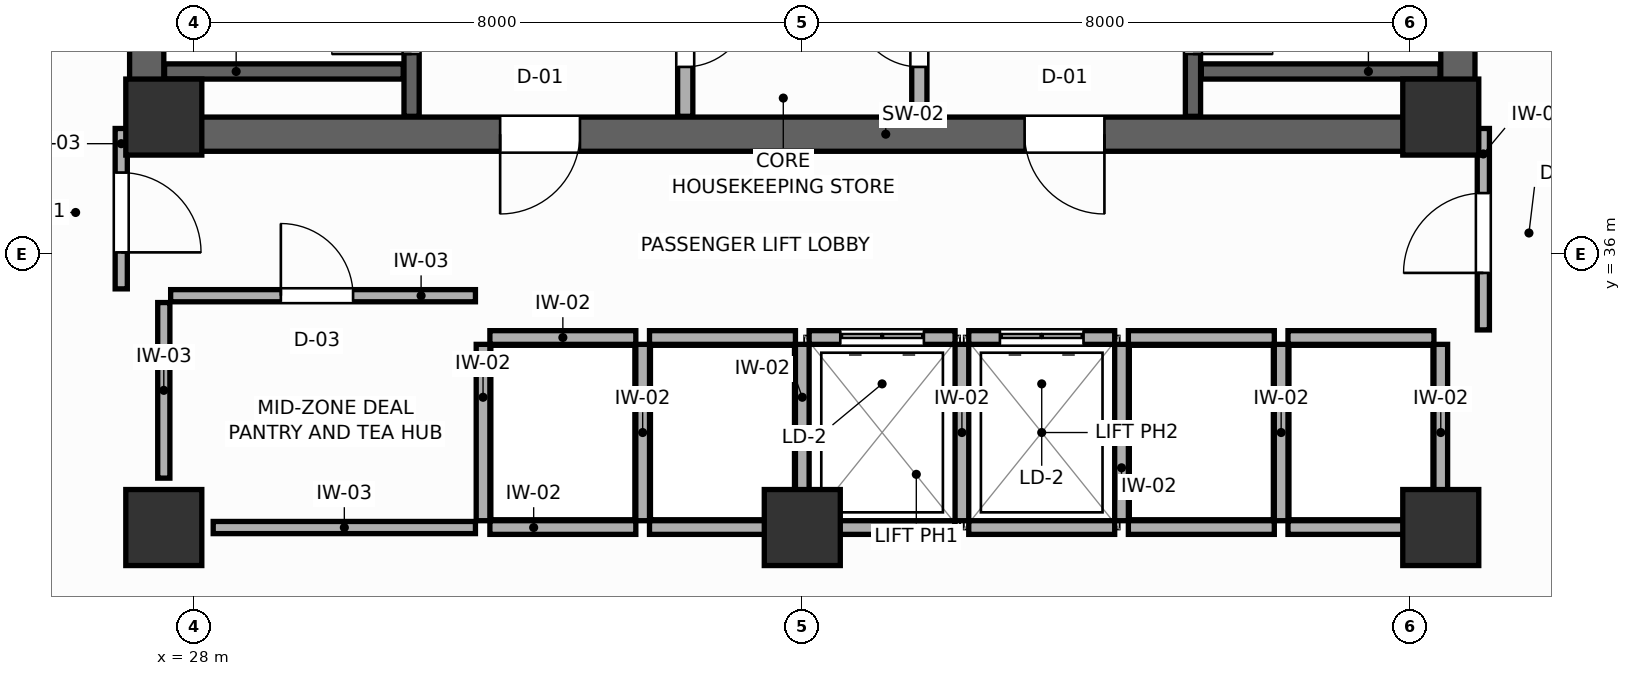
"""IFC4 building model, lengths in metres.
Left out: names, types, materials, properties, quantities, classifications, styles, units other than length and angle.
Written with IfcOpenShell. Run it as: python <this file> out.ifc"""

import sys

from ifc_helpers import new_model, si_unit, direction, frame, frame_2d, origin, origin_2d, place, context, subcontext, project, spatial, rectangle, extrude, source, transform, mapped, element, fill, save


model = new_model("IFC4")
c1 = context("Model", 3, precision=1e-05, world=origin(), true_north=direction((0.0, 1.0)))
c2 = subcontext(c1, "Body", "Model", "MODEL_VIEW")
j1 = project(units=[si_unit("LENGTHUNIT", "METRE"), si_unit("PLANEANGLEUNIT", "RADIAN")], contexts=[c1])
p1 = place(None, origin())
s1 = spatial("IfcSite", under=j1, at=p1, CompositionType="ELEMENT")
p2 = place(p1, origin())
s2 = spatial("IfcBuilding", under=s1, at=p2, CompositionType="ELEMENT")
p3 = place(p2, frame((0.0, 0.0, 172.2)))
s3 = spatial("IfcBuildingStorey", under=s2, at=p3, CompositionType="ELEMENT", Elevation=172.2)
p4 = place(p3, frame((27.15, 37.575, 0.0), z_axis=(0.0, 0.0, 1.0), x_axis=(1.0, 0.0, 0.0)))
e1 = element("IfcWall", 1, at=p4, inside=s3, PredefinedType="SHEAR", context=c2, shape_type="SweptSolid", body=[
    extrude(rectangle(XDim=17.7, YDim=0.45, at=frame_2d((8.85, 0.0))), origin(), (0.0, 0.0, 1.0), 3.6),
])
p5 = place(p4, frame((4.875, 0.0, 0.0)))
e2 = element("IfcOpeningElement", 2, at=p5, cuts=e1, PredefinedType="OPENING", context=c2, shape_type="SweptSolid", body=[
    extrude(rectangle(XDim=1.05, YDim=2.1, at=frame_2d((0.525, 1.05))), frame((0.0, 0.235, 0.0), z_axis=(0.0, -1.0, 0.0), x_axis=(1.0, 0.0, 0.0)), (0.0, 0.0, 1.0), 0.47),
])
p6 = place(p4, frame((11.775, 0.0, 0.0)))
e3 = element("IfcOpeningElement", 3, at=p6, cuts=e1, PredefinedType="OPENING", context=c2, shape_type="SweptSolid", body=[
    extrude(rectangle(XDim=1.05, YDim=2.1, at=frame_2d((0.525, 1.05))), frame((0.0, 0.235, 0.0), z_axis=(0.0, -1.0, 0.0), x_axis=(1.0, 0.0, 0.0)), (0.0, 0.0, 1.0), 0.47),
])
for number, where, z_axis, x_axis in (
    (4, (27.375, 37.8, 0.0), (0.0, 0.0, 1.0), (0.0, 1.0, 0.0)),
    (5, (44.625, 37.8, 0.0), (0.0, 0.0, 1.0), (0.0, 1.0, 0.0)),
):
    element("IfcWall", number, at=place(p3, frame(where, z_axis=z_axis, x_axis=x_axis)), inside=s3, PredefinedType="SHEAR", context=c2, shape_type="SweptSolid", body=[
        extrude(rectangle(XDim=9.0, YDim=0.45, at=frame_2d((4.5, 0.0))), origin(), (0.0, 0.0, 1.0), 3.6),
    ])
m1 = source(origin(), c2, "Body", "SweptSolid", [
    extrude(rectangle(XDim=1.0, YDim=1.0, at=origin_2d()), origin(), (0.0, 0.0, 1.0), 3.6),
])
for number, where, z_axis, x_axis in (
    (6, (27.6, 37.8, 0.0), (0.0, 0.0, 1.0), (1.0, 0.0, 0.0)),
    (7, (44.4, 37.8, 0.0), (0.0, 0.0, 1.0), (1.0, 0.0, 0.0)),
    (8, (27.6, 32.4, 0.0), (0.0, 0.0, 1.0), (1.0, 0.0, 0.0)),
    (9, (44.4, 32.4, 0.0), (0.0, 0.0, 1.0), (1.0, 0.0, 0.0)),
    (10, (36.0, 32.4, 0.0), (0.0, 0.0, 1.0), (1.0, 0.0, 0.0)),
):
    element("IfcColumn", number, at=place(p3, frame(where, z_axis=z_axis, x_axis=x_axis)), inside=s3, PredefinedType="COLUMN", context=c2, shape_type="MappedRepresentation", body=[
        mapped(m1, transform((0.0, 0.0, 0.0), scale=1.0)),
    ])
p7 = place(p3, frame((30.86, 37.81, 0.0), z_axis=(0.0, 0.0, 1.0), x_axis=(0.0, 1.0, 0.0)))
e11 = element("IfcWall", 11, at=p7, inside=s3, PredefinedType="SHEAR", context=c2, shape_type="SweptSolid", body=[
    extrude(rectangle(XDim=8.98, YDim=0.2, at=frame_2d((4.49, 0.0))), origin(), (0.0, 0.0, 1.0), 3.6),
])
p8 = place(p7, frame((0.82, 0.0, 0.0)))
e12 = element("IfcOpeningElement", 12, at=p8, cuts=e11, PredefinedType="OPENING", context=c2, shape_type="SweptSolid", body=[
    extrude(rectangle(XDim=1.05, YDim=2.1, at=frame_2d((0.525, 1.05))), frame((0.0, 0.11, 0.0), z_axis=(0.0, -1.0, 0.0), x_axis=(1.0, 0.0, 0.0)), (0.0, 0.0, 1.0), 0.22),
])
p9 = place(p3, frame((27.61, 38.4, 0.0), z_axis=(0.0, 0.0, 1.0), x_axis=(1.0, 0.0, 0.0)))
e13 = element("IfcWall", 13, at=p9, inside=s3, PredefinedType="SHEAR", context=c2, shape_type="SweptSolid", body=[
    extrude(rectangle(XDim=3.14, YDim=0.2, at=frame_2d((1.57, 0.0))), origin(), (0.0, 0.0, 1.0), 3.6),
])
p10 = place(p3, frame((41.14, 37.81, 0.0), z_axis=(0.0, 0.0, 1.0), x_axis=(0.0, 1.0, 0.0)))
e14 = element("IfcWall", 14, at=p10, inside=s3, PredefinedType="SHEAR", context=c2, shape_type="SweptSolid", body=[
    extrude(rectangle(XDim=8.98, YDim=0.2, at=frame_2d((4.49, 0.0))), origin(), (0.0, 0.0, 1.0), 3.6),
])
p11 = place(p10, frame((0.82, 0.0, 0.0)))
e15 = element("IfcOpeningElement", 15, at=p11, cuts=e14, PredefinedType="OPENING", context=c2, shape_type="SweptSolid", body=[
    extrude(rectangle(XDim=1.05, YDim=2.1, at=frame_2d((0.525, 1.05))), frame((0.0, 0.11, 0.0), z_axis=(0.0, -1.0, 0.0), x_axis=(1.0, 0.0, 0.0)), (0.0, 0.0, 1.0), 0.22),
])
p12 = place(p3, frame((41.25, 38.4, 0.0), z_axis=(0.0, 0.0, 1.0), x_axis=(1.0, 0.0, 0.0)))
e16 = element("IfcWall", 16, at=p12, inside=s3, PredefinedType="SHEAR", context=c2, shape_type="SweptSolid", body=[
    extrude(rectangle(XDim=3.14, YDim=0.2, at=frame_2d((1.57, 0.0))), origin(), (0.0, 0.0, 1.0), 3.6),
])
p13 = place(p3, frame((34.46, 37.81, 0.0), z_axis=(0.0, 0.0, 1.0), x_axis=(0.0, 1.0, 0.0)))
e17 = element("IfcWall", 17, at=p13, inside=s3, PredefinedType="PARTITIONING", context=c2, shape_type="SweptSolid", body=[
    extrude(rectangle(XDim=8.98, YDim=0.2, at=frame_2d((4.49, 0.0))), origin(), (0.0, 0.0, 1.0), 3.4),
])
p14 = place(p13, frame((0.65, 0.0, 0.0)))
e18 = element("IfcOpeningElement", 18, at=p14, cuts=e17, PredefinedType="OPENING", context=c2, shape_type="SweptSolid", body=[
    extrude(rectangle(XDim=0.85, YDim=2.05, at=frame_2d((0.425, 1.025))), frame((0.0, 0.11, 0.0), z_axis=(0.0, -1.0, 0.0), x_axis=(1.0, 0.0, 0.0)), (0.0, 0.0, 1.0), 0.22),
])
p15 = place(p3, frame((37.54, 37.81, 0.0), z_axis=(0.0, 0.0, 1.0), x_axis=(0.0, 1.0, 0.0)))
e19 = element("IfcWall", 19, at=p15, inside=s3, PredefinedType="PARTITIONING", context=c2, shape_type="SweptSolid", body=[
    extrude(rectangle(XDim=8.98, YDim=0.2, at=frame_2d((4.49, 0.0))), origin(), (0.0, 0.0, 1.0), 3.4),
])
p16 = place(p15, frame((0.65, 0.0, 0.0)))
e20 = element("IfcOpeningElement", 20, at=p16, cuts=e19, PredefinedType="OPENING", context=c2, shape_type="SweptSolid", body=[
    extrude(rectangle(XDim=0.85, YDim=2.05, at=frame_2d((0.425, 1.025))), frame((0.0, 0.11, 0.0), z_axis=(0.0, -1.0, 0.0), x_axis=(1.0, 0.0, 0.0)), (0.0, 0.0, 1.0), 0.22),
])
p17 = place(p3, frame((31.89, 34.9, 0.0), z_axis=(0.0, 0.0, 1.0), x_axis=(1.0, 0.0, 0.0)))
e21 = element("IfcWall", 21, at=p17, inside=s3, PredefinedType="PARTITIONING", context=c2, shape_type="SweptSolid", body=[
    extrude(rectangle(XDim=1.92, YDim=0.18, at=frame_2d((0.96, 0.0))), origin(), (0.0, 0.0, 1.0), 3.4),
])
p18 = place(p3, frame((31.89, 32.4, 0.0), z_axis=(0.0, 0.0, 1.0), x_axis=(1.0, 0.0, 0.0)))
e22 = element("IfcWall", 22, at=p18, inside=s3, PredefinedType="PARTITIONING", context=c2, shape_type="SweptSolid", body=[
    extrude(rectangle(XDim=1.92, YDim=0.18, at=frame_2d((0.96, 0.0))), origin(), (0.0, 0.0, 1.0), 2.95),
])
p19 = place(p3, frame((31.8, 32.49, 0.0), z_axis=(0.0, 0.0, 1.0), x_axis=(0.0, 1.0, 0.0)))
e23 = element("IfcWall", 23, at=p19, inside=s3, PredefinedType="PARTITIONING", context=c2, shape_type="SweptSolid", body=[
    extrude(rectangle(XDim=2.32, YDim=0.18, at=frame_2d((1.16, 0.0))), origin(), (0.0, 0.0, 1.0), 3.4),
])
p20 = place(p3, frame((33.99, 34.9, 0.0), z_axis=(0.0, 0.0, 1.0), x_axis=(1.0, 0.0, 0.0)))
e24 = element("IfcWall", 24, at=p20, inside=s3, PredefinedType="PARTITIONING", context=c2, shape_type="SweptSolid", body=[
    extrude(rectangle(XDim=1.92, YDim=0.18, at=frame_2d((0.96, 0.0))), origin(), (0.0, 0.0, 1.0), 3.4),
])
p21 = place(p3, frame((33.99, 32.4, 0.0), z_axis=(0.0, 0.0, 1.0), x_axis=(1.0, 0.0, 0.0)))
e25 = element("IfcWall", 25, at=p21, inside=s3, PredefinedType="PARTITIONING", context=c2, shape_type="SweptSolid", body=[
    extrude(rectangle(XDim=1.92, YDim=0.18, at=frame_2d((0.96, 0.0))), origin(), (0.0, 0.0, 1.0), 2.95),
])
p22 = place(p3, frame((33.9, 32.49, 0.0), z_axis=(0.0, 0.0, 1.0), x_axis=(0.0, 1.0, 0.0)))
e26 = element("IfcWall", 26, at=p22, inside=s3, PredefinedType="PARTITIONING", context=c2, shape_type="SweptSolid", body=[
    extrude(rectangle(XDim=2.32, YDim=0.18, at=frame_2d((1.16, 0.0))), origin(), (0.0, 0.0, 1.0), 3.4),
])
p23 = place(p3, frame((36.09, 34.9, 0.0), z_axis=(0.0, 0.0, 1.0), x_axis=(1.0, 0.0, 0.0)))
e27 = element("IfcWall", 27, at=p23, inside=s3, PredefinedType="PARTITIONING", context=c2, shape_type="SweptSolid", body=[
    extrude(rectangle(XDim=1.92, YDim=0.18, at=frame_2d((0.96, 0.0))), origin(), (0.0, 0.0, 1.0), 3.4),
])
p24 = place(p23, frame((0.41, 0.0, 0.0)))
e28 = element("IfcOpeningElement", 28, at=p24, cuts=e27, PredefinedType="OPENING", context=c2, shape_type="SweptSolid", body=[
    extrude(rectangle(XDim=1.1, YDim=2.1, at=frame_2d((0.55, 1.05))), frame((0.0, 0.1, 0.0), z_axis=(0.0, -1.0, 0.0), x_axis=(1.0, 0.0, 0.0)), (0.0, 0.0, 1.0), 0.2),
])
p25 = place(p3, frame((36.09, 32.4, 0.0), z_axis=(0.0, 0.0, 1.0), x_axis=(1.0, 0.0, 0.0)))
e29 = element("IfcWall", 29, at=p25, inside=s3, PredefinedType="PARTITIONING", context=c2, shape_type="SweptSolid", body=[
    extrude(rectangle(XDim=1.92, YDim=0.18, at=frame_2d((0.96, 0.0))), origin(), (0.0, 0.0, 1.0), 2.95),
])
p26 = place(p3, frame((36.0, 32.49, 0.0), z_axis=(0.0, 0.0, 1.0), x_axis=(0.0, 1.0, 0.0)))
e30 = element("IfcWall", 30, at=p26, inside=s3, PredefinedType="PARTITIONING", context=c2, shape_type="SweptSolid", body=[
    extrude(rectangle(XDim=2.32, YDim=0.18, at=frame_2d((1.16, 0.0))), origin(), (0.0, 0.0, 1.0), 3.4),
])
p27 = place(p3, frame((38.19, 34.9, 0.0), z_axis=(0.0, 0.0, 1.0), x_axis=(1.0, 0.0, 0.0)))
e31 = element("IfcWall", 31, at=p27, inside=s3, PredefinedType="PARTITIONING", context=c2, shape_type="SweptSolid", body=[
    extrude(rectangle(XDim=1.92, YDim=0.18, at=frame_2d((0.96, 0.0))), origin(), (0.0, 0.0, 1.0), 3.4),
])
p28 = place(p27, frame((0.41, 0.0, 0.0)))
e32 = element("IfcOpeningElement", 32, at=p28, cuts=e31, PredefinedType="OPENING", context=c2, shape_type="SweptSolid", body=[
    extrude(rectangle(XDim=1.1, YDim=2.1, at=frame_2d((0.55, 1.05))), frame((0.0, 0.1, 0.0), z_axis=(0.0, -1.0, 0.0), x_axis=(1.0, 0.0, 0.0)), (0.0, 0.0, 1.0), 0.2),
])
p29 = place(p3, frame((38.19, 32.4, 0.0), z_axis=(0.0, 0.0, 1.0), x_axis=(1.0, 0.0, 0.0)))
e33 = element("IfcWall", 33, at=p29, inside=s3, PredefinedType="PARTITIONING", context=c2, shape_type="SweptSolid", body=[
    extrude(rectangle(XDim=1.92, YDim=0.18, at=frame_2d((0.96, 0.0))), origin(), (0.0, 0.0, 1.0), 2.95),
])
p30 = place(p3, frame((38.1, 32.49, 0.0), z_axis=(0.0, 0.0, 1.0), x_axis=(0.0, 1.0, 0.0)))
e34 = element("IfcWall", 34, at=p30, inside=s3, PredefinedType="PARTITIONING", context=c2, shape_type="SweptSolid", body=[
    extrude(rectangle(XDim=2.32, YDim=0.18, at=frame_2d((1.16, 0.0))), origin(), (0.0, 0.0, 1.0), 3.4),
])
p31 = place(p3, frame((40.29, 34.9, 0.0), z_axis=(0.0, 0.0, 1.0), x_axis=(1.0, 0.0, 0.0)))
e35 = element("IfcWall", 35, at=p31, inside=s3, PredefinedType="PARTITIONING", context=c2, shape_type="SweptSolid", body=[
    extrude(rectangle(XDim=1.92, YDim=0.18, at=frame_2d((0.96, 0.0))), origin(), (0.0, 0.0, 1.0), 3.4),
])
p32 = place(p3, frame((40.29, 32.4, 0.0), z_axis=(0.0, 0.0, 1.0), x_axis=(1.0, 0.0, 0.0)))
e36 = element("IfcWall", 36, at=p32, inside=s3, PredefinedType="PARTITIONING", context=c2, shape_type="SweptSolid", body=[
    extrude(rectangle(XDim=1.92, YDim=0.18, at=frame_2d((0.96, 0.0))), origin(), (0.0, 0.0, 1.0), 2.95),
])
p33 = place(p3, frame((40.2, 32.49, 0.0), z_axis=(0.0, 0.0, 1.0), x_axis=(0.0, 1.0, 0.0)))
e37 = element("IfcWall", 37, at=p33, inside=s3, PredefinedType="PARTITIONING", context=c2, shape_type="SweptSolid", body=[
    extrude(rectangle(XDim=2.32, YDim=0.18, at=frame_2d((1.16, 0.0))), origin(), (0.0, 0.0, 1.0), 3.4),
])
p34 = place(p3, frame((42.39, 34.9, 0.0), z_axis=(0.0, 0.0, 1.0), x_axis=(1.0, 0.0, 0.0)))
e38 = element("IfcWall", 38, at=p34, inside=s3, PredefinedType="PARTITIONING", context=c2, shape_type="SweptSolid", body=[
    extrude(rectangle(XDim=1.92, YDim=0.18, at=frame_2d((0.96, 0.0))), origin(), (0.0, 0.0, 1.0), 3.4),
])
p35 = place(p3, frame((42.39, 32.4, 0.0), z_axis=(0.0, 0.0, 1.0), x_axis=(1.0, 0.0, 0.0)))
e39 = element("IfcWall", 39, at=p35, inside=s3, PredefinedType="PARTITIONING", context=c2, shape_type="SweptSolid", body=[
    extrude(rectangle(XDim=1.92, YDim=0.18, at=frame_2d((0.96, 0.0))), origin(), (0.0, 0.0, 1.0), 2.95),
])
for number, where, z_axis, x_axis in (
    (40, (42.3, 32.49, 0.0), (0.0, 0.0, 1.0), (0.0, 1.0, 0.0)),
    (41, (44.4, 32.49, 0.0), (0.0, 0.0, 1.0), (0.0, 1.0, 0.0)),
):
    element("IfcWall", number, at=place(p3, frame(where, z_axis=z_axis, x_axis=x_axis)), inside=s3, PredefinedType="PARTITIONING", context=c2, shape_type="SweptSolid", body=[
        extrude(rectangle(XDim=2.32, YDim=0.18, at=frame_2d((1.16, 0.0))), origin(), (0.0, 0.0, 1.0), 3.4),
    ])
p36 = place(p3, frame((28.25, 32.4, 0.0), z_axis=(0.0, 0.0, 1.0), x_axis=(1.0, 0.0, 0.0)))
e42 = element("IfcWall", 42, at=p36, inside=s3, PredefinedType="PARTITIONING", context=c2, shape_type="SweptSolid", body=[
    extrude(rectangle(XDim=3.45, YDim=0.16, at=frame_2d((1.725, 0.0))), origin(), (0.0, 0.0, 1.0), 2.95),
])
p37 = place(p3, frame((27.6, 33.05, 0.0), z_axis=(0.0, 0.0, 1.0), x_axis=(0.0, 1.0, 0.0)))
e43 = element("IfcWall", 43, at=p37, inside=s3, PredefinedType="PARTITIONING", context=c2, shape_type="SweptSolid", body=[
    extrude(rectangle(XDim=2.31, YDim=0.16, at=frame_2d((1.155, 0.0))), origin(), (0.0, 0.0, 1.0), 3.4),
])
p38 = place(p3, frame((27.69, 35.45, 0.0), z_axis=(0.0, 0.0, 1.0), x_axis=(1.0, 0.0, 0.0)))
e44 = element("IfcWall", 44, at=p38, inside=s3, PredefinedType="PARTITIONING", context=c2, shape_type="SweptSolid", body=[
    extrude(rectangle(XDim=4.01, YDim=0.16, at=frame_2d((2.005, 0.0))), origin(), (0.0, 0.0, 1.0), 3.4),
])
p39 = place(p38, frame((1.45, 0.0, 0.0)))
e45 = element("IfcOpeningElement", 45, at=p39, cuts=e44, PredefinedType="OPENING", context=c2, shape_type="SweptSolid", body=[
    extrude(rectangle(XDim=0.95, YDim=2.05, at=frame_2d((0.475, 1.025))), frame((0.0, 0.09, 0.0), z_axis=(0.0, -1.0, 0.0), x_axis=(1.0, 0.0, 0.0)), (0.0, 0.0, 1.0), 0.18),
])
p40 = place(p3, frame((27.04, 35.54, 0.0), z_axis=(0.0, 0.0, 1.0), x_axis=(0.0, 1.0, 0.0)))
e46 = element("IfcWall", 46, at=p40, inside=s3, PredefinedType="PARTITIONING", context=c2, shape_type="SweptSolid", body=[
    extrude(rectangle(XDim=2.11, YDim=0.16, at=frame_2d((1.055, 0.0))), origin(), (0.0, 0.0, 1.0), 3.4),
])
p41 = place(p40, frame((0.48, 0.0, 0.0)))
e47 = element("IfcOpeningElement", 47, at=p41, cuts=e46, PredefinedType="OPENING", context=c2, shape_type="SweptSolid", body=[
    extrude(rectangle(XDim=1.05, YDim=2.1, at=frame_2d((0.525, 1.05))), frame((0.0, 0.09, 0.0), z_axis=(0.0, -1.0, 0.0), x_axis=(1.0, 0.0, 0.0)), (0.0, 0.0, 1.0), 0.18),
])
p42 = place(p3, frame((44.96, 35.0, 0.0), z_axis=(0.0, 0.0, 1.0), x_axis=(0.0, 1.0, 0.0)))
e48 = element("IfcWall", 48, at=p42, inside=s3, PredefinedType="PARTITIONING", context=c2, shape_type="SweptSolid", body=[
    extrude(rectangle(XDim=2.65, YDim=0.16, at=frame_2d((1.325, 0.0))), origin(), (0.0, 0.0, 1.0), 3.4),
])
p43 = place(p42, frame((0.75, 0.0, 0.0)))
e49 = element("IfcOpeningElement", 49, at=p43, cuts=e48, PredefinedType="OPENING", context=c2, shape_type="SweptSolid", body=[
    extrude(rectangle(XDim=1.05, YDim=2.1, at=frame_2d((0.525, 1.05))), frame((0.0, 0.09, 0.0), z_axis=(0.0, -1.0, 0.0), x_axis=(1.0, 0.0, 0.0)), (0.0, 0.0, 1.0), 0.18),
])
p44 = place(p8, origin())
e50 = element("IfcDoor", 50, at=p44, inside=s3, OperationType="SINGLE_SWING_LEFT", PredefinedType="DOOR", context=c2, shape_type="SweptSolid", body=[
    extrude(rectangle(XDim=1.05, YDim=2.1, at=frame_2d((0.525, 1.05))), frame((0.0, 0.025, 0.0), z_axis=(0.0, -1.0, 0.0), x_axis=(1.0, 0.0, 0.0)), (0.0, 0.0, 1.0), 0.05),
])
fill(e12, e50)
p45 = place(p11, frame((1.05, 0.0, 0.0), z_axis=(0.0, 0.0, 1.0), x_axis=(-1.0, 0.0, 0.0)))
e51 = element("IfcDoor", 51, at=p45, inside=s3, OperationType="SINGLE_SWING_RIGHT", PredefinedType="DOOR", context=c2, shape_type="SweptSolid", body=[
    extrude(rectangle(XDim=1.05, YDim=2.1, at=frame_2d((0.525, 1.05))), frame((0.0, 0.025, 0.0), z_axis=(0.0, -1.0, 0.0), x_axis=(1.0, 0.0, 0.0)), (0.0, 0.0, 1.0), 0.05),
])
fill(e15, e51)
p46 = place(p14, frame((0.85, 0.0, 0.0), z_axis=(0.0, 0.0, 1.0), x_axis=(-1.0, 0.0, 0.0)))
e52 = element("IfcDoor", 52, at=p46, inside=s3, OperationType="SINGLE_SWING_LEFT", PredefinedType="DOOR", context=c2, shape_type="SweptSolid", body=[
    extrude(rectangle(XDim=0.85, YDim=2.05, at=frame_2d((0.425, 1.025))), frame((0.0, 0.025, 0.0), z_axis=(0.0, -1.0, 0.0), x_axis=(1.0, 0.0, 0.0)), (0.0, 0.0, 1.0), 0.05),
])
fill(e18, e52)
p47 = place(p16, origin())
e53 = element("IfcDoor", 53, at=p47, inside=s3, OperationType="SINGLE_SWING_RIGHT", PredefinedType="DOOR", context=c2, shape_type="SweptSolid", body=[
    extrude(rectangle(XDim=0.85, YDim=2.05, at=frame_2d((0.425, 1.025))), frame((0.0, 0.025, 0.0), z_axis=(0.0, -1.0, 0.0), x_axis=(1.0, 0.0, 0.0)), (0.0, 0.0, 1.0), 0.05),
])
fill(e20, e53)
p48 = place(p24, origin())
e54 = element("IfcDoor", 54, at=p48, inside=s3, OperationType="DOUBLE_DOOR_SLIDING", PredefinedType="DOOR", context=c2, shape_type="SweptSolid", body=[
    extrude(rectangle(XDim=1.1, YDim=2.1, at=frame_2d((0.55, 1.05))), frame((0.0, 0.025, 0.0), z_axis=(0.0, -1.0, 0.0), x_axis=(1.0, 0.0, 0.0)), (0.0, 0.0, 1.0), 0.05),
])
fill(e28, e54)
p49 = place(p28, origin())
e55 = element("IfcDoor", 55, at=p49, inside=s3, OperationType="DOUBLE_DOOR_SLIDING", PredefinedType="DOOR", context=c2, shape_type="SweptSolid", body=[
    extrude(rectangle(XDim=1.1, YDim=2.1, at=frame_2d((0.55, 1.05))), frame((0.0, 0.025, 0.0), z_axis=(0.0, -1.0, 0.0), x_axis=(1.0, 0.0, 0.0)), (0.0, 0.0, 1.0), 0.05),
])
fill(e32, e55)
p50 = place(p39, origin())
e56 = element("IfcDoor", 56, at=p50, inside=s3, OperationType="SINGLE_SWING_LEFT", PredefinedType="DOOR", context=c2, shape_type="SweptSolid", body=[
    extrude(rectangle(XDim=0.95, YDim=2.05, at=frame_2d((0.475, 1.025))), frame((0.0, 0.025, 0.0), z_axis=(0.0, -1.0, 0.0), x_axis=(1.0, 0.0, 0.0)), (0.0, 0.0, 1.0), 0.05),
])
fill(e45, e56)
p51 = place(p41, frame((1.05, 0.0, 0.0), z_axis=(0.0, 0.0, 1.0), x_axis=(-1.0, 0.0, 0.0)))
e57 = element("IfcDoor", 57, at=p51, inside=s3, OperationType="SINGLE_SWING_RIGHT", PredefinedType="DOOR", context=c2, shape_type="SweptSolid", body=[
    extrude(rectangle(XDim=1.05, YDim=2.1, at=frame_2d((0.525, 1.05))), frame((0.0, 0.025, 0.0), z_axis=(0.0, -1.0, 0.0), x_axis=(1.0, 0.0, 0.0)), (0.0, 0.0, 1.0), 0.05),
])
fill(e47, e57)
p52 = place(p43, origin())
e58 = element("IfcDoor", 58, at=p52, inside=s3, OperationType="SINGLE_SWING_LEFT", PredefinedType="DOOR", context=c2, shape_type="SweptSolid", body=[
    extrude(rectangle(XDim=1.05, YDim=2.1, at=frame_2d((0.525, 1.05))), frame((0.0, 0.025, 0.0), z_axis=(0.0, -1.0, 0.0), x_axis=(1.0, 0.0, 0.0)), (0.0, 0.0, 1.0), 0.05),
])
fill(e49, e58)
p53 = place(p5, frame((1.05, 0.0, 0.0), z_axis=(0.0, 0.0, 1.0), x_axis=(-1.0, 0.0, 0.0)))
e59 = element("IfcDoor", 59, at=p53, inside=s3, OperationType="SINGLE_SWING_RIGHT", PredefinedType="DOOR", context=c2, shape_type="SweptSolid", body=[
    extrude(rectangle(XDim=1.05, YDim=2.1, at=frame_2d((0.525, 1.05))), frame((0.0, 0.025, 0.0), z_axis=(0.0, -1.0, 0.0), x_axis=(1.0, 0.0, 0.0)), (0.0, 0.0, 1.0), 0.05),
])
fill(e2, e59)
p54 = place(p6, frame((1.05, 0.0, 0.0), z_axis=(0.0, 0.0, 1.0), x_axis=(-1.0, 0.0, 0.0)))
e60 = element("IfcDoor", 60, at=p54, inside=s3, OperationType="SINGLE_SWING_LEFT", PredefinedType="DOOR", context=c2, shape_type="SweptSolid", body=[
    extrude(rectangle(XDim=1.05, YDim=2.1, at=frame_2d((0.525, 1.05))), frame((0.0, 0.025, 0.0), z_axis=(0.0, -1.0, 0.0), x_axis=(1.0, 0.0, 0.0)), (0.0, 0.0, 1.0), 0.05),
])
fill(e3, e60)
save(model, sys.argv[1])
